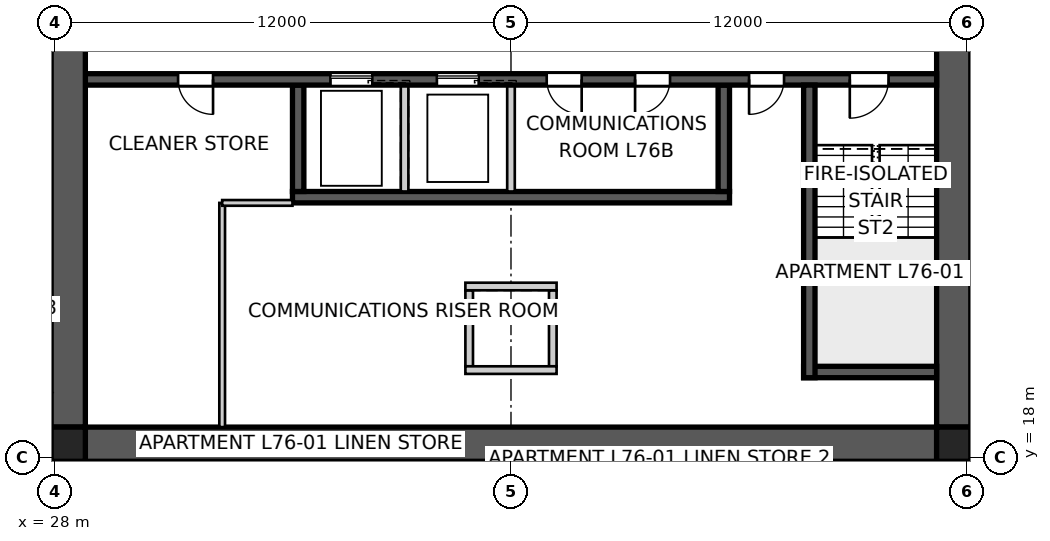
"""IFC4 building model, lengths in metres.
Left out: names, types, materials, properties, quantities, classifications, styles, units other than length and angle.
Written with IfcOpenShell. Run it as: python <this file> out.ifc"""

import sys

from ifc_helpers import new_model, si_unit, direction, frame, frame_2d, origin, origin_2d, place, context, subcontext, project, spatial, polyline, rectangle, outline, extrude, element, fill, save


model = new_model("IFC4")
c1 = context("Model", 3, precision=1e-05, world=origin(), true_north=direction((0.0, 1.0)))
c2 = subcontext(c1, "Body", "Model", "MODEL_VIEW")
j1 = project(units=[si_unit("LENGTHUNIT", "METRE"), si_unit("PLANEANGLEUNIT", "RADIAN")], contexts=[c1])
p1 = place(None, origin())
s1 = spatial("IfcSite", under=j1, at=p1, CompositionType="ELEMENT")
p2 = place(p1, origin())
s2 = spatial("IfcBuilding", under=s1, at=p2, CompositionType="ELEMENT")
p3 = place(p2, frame((0.0, 0.0, 276.0)))
s3 = spatial("IfcBuildingStorey", under=s2, at=p3, CompositionType="ELEMENT", Elevation=276.0)
p4 = place(p3, frame((51.2, 18.35, 0.0), z_axis=(0.0, 0.0, 1.0), x_axis=(-1.0, 0.0, 0.0)))
e1 = element("IfcWall", 1, at=p4, inside=s3, PredefinedType="SHEAR", context=c2, shape_type="SweptSolid", body=[
    extrude(outline(polyline([(0.0, -0.45), (22.4, -0.45), (22.4, -0.025), (22.85, -0.025), (22.85, 0.025), (22.4, 0.025), (22.4, 0.45), (0.0, 0.45), (0.0, 0.025), (-0.45, 0.025), (-0.45, -0.025), (0.0, -0.025), (0.0, -0.45)])), origin(), (0.0, 0.0, 1.0), 3.4),
])
p5 = place(p3, frame((51.65, 18.8, 0.0), z_axis=(0.0, 0.0, 1.0), x_axis=(0.0, 1.0, 0.0)))
e2 = element("IfcWall", 2, at=p5, inside=s3, PredefinedType="SHEAR", context=c2, shape_type="SweptSolid", body=[
    extrude(outline(polyline([(0.0, -0.45), (22.4, -0.45), (22.4, -0.025), (22.85, -0.025), (22.85, 0.025), (22.4, 0.025), (22.4, 0.45), (0.0, 0.45), (0.0, 0.025), (-0.45, 0.025), (-0.45, -0.025), (0.0, -0.025), (0.0, -0.45)])), origin(), (0.0, 0.0, 1.0), 3.4),
])
p6 = place(p5, frame((11.14, 0.0, 0.0)))
e3 = element("IfcOpeningElement", 3, at=p6, cuts=e2, PredefinedType="OPENING", context=c2, shape_type="SweptSolid", body=[
    extrude(rectangle(XDim=1.02, YDim=2.4, at=frame_2d((0.51, 1.2))), frame((0.0, 0.46, 0.0), z_axis=(0.0, -1.0, 0.0), x_axis=(1.0, 0.0, 0.0)), (0.0, 0.0, 1.0), 0.92),
])
p7 = place(p3, frame((28.35, 41.2, 0.0), z_axis=(0.0, 0.0, 1.0), x_axis=(0.0, -1.0, 0.0)))
e4 = element("IfcWall", 4, at=p7, inside=s3, PredefinedType="SHEAR", context=c2, shape_type="SweptSolid", body=[
    extrude(outline(polyline([(0.0, -0.45), (22.4, -0.45), (22.4, -0.025), (22.85, -0.025), (22.85, 0.025), (22.4, 0.025), (22.4, 0.45), (0.0, 0.45), (0.0, 0.025), (-0.45, 0.025), (-0.45, -0.025), (0.0, -0.025), (0.0, -0.45)])), origin(), (0.0, 0.0, 1.0), 3.4),
])
p8 = place(p7, frame((11.14, 0.0, 0.0)))
e5 = element("IfcOpeningElement", 5, at=p8, cuts=e4, PredefinedType="OPENING", context=c2, shape_type="SweptSolid", body=[
    extrude(rectangle(XDim=1.02, YDim=2.4, at=frame_2d((0.51, 1.2))), frame((0.0, 0.46, 0.0), z_axis=(0.0, -1.0, 0.0), x_axis=(1.0, 0.0, 0.0)), (0.0, 0.0, 1.0), 0.92),
])
p9 = place(p3, frame((51.2, 27.95, 0.0), z_axis=(0.0, 0.0, 1.0), x_axis=(-1.0, 0.0, 0.0)))
e6 = element("IfcWall", 6, at=p9, inside=s3, PredefinedType="SHEAR", context=c2, shape_type="SweptSolid", body=[
    extrude(rectangle(XDim=22.4, YDim=0.3, at=frame_2d((11.2, 0.0))), origin(), (0.0, 0.0, 1.0), 3.4),
])
p10 = place(p9, frame((19.04, 0.0, 0.0)))
e7 = element("IfcOpeningElement", 7, at=p10, cuts=e6, PredefinedType="OPENING", context=c2, shape_type="SweptSolid", body=[
    extrude(rectangle(XDim=0.92, YDim=2.1, at=frame_2d((0.46, 1.05))), frame((0.0, 0.16, 0.0), z_axis=(0.0, -1.0, 0.0), x_axis=(1.0, 0.0, 0.0)), (0.0, 0.0, 1.0), 0.32),
])
p11 = place(p9, frame((1.265, 0.0, 0.0)))
e8 = element("IfcOpeningElement", 8, at=p11, cuts=e6, PredefinedType="OPENING", context=c2, shape_type="SweptSolid", body=[
    extrude(rectangle(XDim=1.02, YDim=2.1, at=frame_2d((0.51, 1.05))), frame((0.0, 0.16, 0.0), z_axis=(0.0, -1.0, 0.0), x_axis=(1.0, 0.0, 0.0)), (0.0, 0.0, 1.0), 0.32),
])
p12 = place(p9, frame((4.015, 0.0, 0.0)))
e9 = element("IfcOpeningElement", 9, at=p12, cuts=e6, PredefinedType="OPENING", context=c2, shape_type="SweptSolid", body=[
    extrude(rectangle(XDim=0.92, YDim=2.1, at=frame_2d((0.46, 1.05))), frame((0.0, 0.16, 0.0), z_axis=(0.0, -1.0, 0.0), x_axis=(1.0, 0.0, 0.0)), (0.0, 0.0, 1.0), 0.32),
])
p13 = place(p9, frame((9.34, 0.0, 0.0)))
e10 = element("IfcOpeningElement", 10, at=p13, cuts=e6, PredefinedType="OPENING", context=c2, shape_type="SweptSolid", body=[
    extrude(rectangle(XDim=0.92, YDim=2.1, at=frame_2d((0.46, 1.05))), frame((0.0, 0.16, 0.0), z_axis=(0.0, -1.0, 0.0), x_axis=(1.0, 0.0, 0.0)), (0.0, 0.0, 1.0), 0.32),
])
p14 = place(p9, frame((7.015, 0.0, 0.0)))
e11 = element("IfcOpeningElement", 11, at=p14, cuts=e6, PredefinedType="OPENING", context=c2, shape_type="SweptSolid", body=[
    extrude(rectangle(XDim=0.92, YDim=2.1, at=frame_2d((0.46, 1.05))), frame((0.0, 0.16, 0.0), z_axis=(0.0, -1.0, 0.0), x_axis=(1.0, 0.0, 0.0)), (0.0, 0.0, 1.0), 0.32),
])
p15 = place(p9, frame((12.05, 0.0, 0.0)))
e12 = element("IfcOpeningElement", 12, at=p15, cuts=e6, PredefinedType="OPENING", context=c2, shape_type="SweptSolid", body=[
    extrude(rectangle(XDim=1.1, YDim=2.1, at=frame_2d((0.55, 1.05))), frame((0.0, 0.16, 0.0), z_axis=(0.0, -1.0, 0.0), x_axis=(1.0, 0.0, 0.0)), (0.0, 0.0, 1.0), 0.32),
])
p16 = place(p9, frame((14.85, 0.0, 0.0)))
e13 = element("IfcOpeningElement", 13, at=p16, cuts=e6, PredefinedType="OPENING", context=c2, shape_type="SweptSolid", body=[
    extrude(rectangle(XDim=1.1, YDim=2.1, at=frame_2d((0.55, 1.05))), frame((0.0, 0.16, 0.0), z_axis=(0.0, -1.0, 0.0), x_axis=(1.0, 0.0, 0.0)), (0.0, 0.0, 1.0), 0.32),
])
p17 = place(p3, frame((45.75, 24.85, 0.0), z_axis=(0.0, 0.0, 1.0), x_axis=(-1.0, 0.0, 0.0)))
e14 = element("IfcWall", 14, at=p17, inside=s3, PredefinedType="SHEAR", context=c2, shape_type="SweptSolid", body=[
    extrude(rectangle(XDim=11.5, YDim=0.3, at=frame_2d((5.75, 0.0))), origin(), (0.0, 0.0, 1.0), 3.4),
])
p18 = place(p3, frame((45.6, 27.8, 0.0), z_axis=(0.0, 0.0, 1.0), x_axis=(0.0, -1.0, 0.0)))
e15 = element("IfcWall", 15, at=p18, inside=s3, PredefinedType="SHEAR", context=c2, shape_type="SweptSolid", body=[
    extrude(rectangle(XDim=2.8, YDim=0.3, at=frame_2d((1.4, 0.0))), origin(), (0.0, 0.0, 1.0), 3.4),
])
for number, where, z_axis, x_axis in (
    (16, (40.0, 27.8, 0.0), (0.0, 0.0, 1.0), (0.0, -1.0, 0.0)),
    (17, (37.2, 27.8, 0.0), (0.0, 0.0, 1.0), (0.0, -1.0, 0.0)),
):
    element("IfcWall", number, at=place(p3, frame(where, z_axis=z_axis, x_axis=x_axis)), inside=s3, PredefinedType="SOLIDWALL", context=c2, shape_type="SweptSolid", body=[
        extrude(rectangle(XDim=2.8, YDim=0.2, at=frame_2d((1.4, 0.0))), origin(), (0.0, 0.0, 1.0), 3.4),
    ])
p19 = place(p3, frame((34.4, 27.8, 0.0), z_axis=(0.0, 0.0, 1.0), x_axis=(0.0, -1.0, 0.0)))
e18 = element("IfcWall", 18, at=p19, inside=s3, PredefinedType="SHEAR", context=c2, shape_type="SweptSolid", body=[
    extrude(rectangle(XDim=2.8, YDim=0.3, at=frame_2d((1.4, 0.0))), origin(), (0.0, 0.0, 1.0), 3.4),
])
p20 = place(p3, frame((47.85, 27.8, 0.0), z_axis=(0.0, 0.0, 1.0), x_axis=(0.0, -1.0, 0.0)))
e19 = element("IfcWall", 19, at=p20, inside=s3, PredefinedType="SHEAR", context=c2, shape_type="SweptSolid", body=[
    extrude(rectangle(XDim=7.7, YDim=0.3, at=frame_2d((3.85, 0.0))), origin(), (0.0, 0.0, 1.0), 3.4),
])
p21 = place(p3, frame((51.2, 20.25, 0.0), z_axis=(0.0, 0.0, 1.0), x_axis=(-1.0, 0.0, 0.0)))
e20 = element("IfcWall", 20, at=p21, inside=s3, PredefinedType="SHEAR", context=c2, shape_type="SweptSolid", body=[
    extrude(rectangle(XDim=3.5, YDim=0.3, at=frame_2d((1.75, 0.0))), origin(), (0.0, 0.0, 1.0), 3.4),
])
for number, where, z_axis, x_axis in (
    (21, (38.9, 22.4, 0.0), (0.0, 0.0, 1.0), (0.0, -1.0, 0.0)),
    (22, (41.1, 22.4, 0.0), (0.0, 0.0, 1.0), (0.0, -1.0, 0.0)),
):
    element("IfcWall", number, at=place(p3, frame(where, z_axis=z_axis, x_axis=x_axis)), inside=s3, PredefinedType="SOLIDWALL", context=c2, shape_type="SweptSolid", body=[
        extrude(rectangle(XDim=2.0, YDim=0.2, at=frame_2d((1.0, 0.0))), origin(), (0.0, 0.0, 1.0), 3.4),
    ])
for number, where, z_axis, x_axis in (
    (23, (38.8, 22.5, 0.0), (0.0, 0.0, 1.0), (1.0, 0.0, 0.0)),
    (24, (38.8, 20.3, 0.0), (0.0, 0.0, 1.0), (1.0, 0.0, 0.0)),
):
    element("IfcWall", number, at=place(p3, frame(where, z_axis=z_axis, x_axis=x_axis)), inside=s3, PredefinedType="SOLIDWALL", context=c2, shape_type="SweptSolid", body=[
        extrude(rectangle(XDim=2.4, YDim=0.2, at=frame_2d((1.2, 0.0))), origin(), (0.0, 0.0, 1.0), 3.4),
    ])
for number, where, z_axis, x_axis in (
    (25, (28.35, 18.35, 0.0), (0.0, 0.0, 1.0), (1.0, 0.0, 0.0)),
    (26, (51.65, 18.35, 0.0), (0.0, 0.0, 1.0), (1.0, 0.0, 0.0)),
):
    element("IfcColumn", number, at=place(p3, frame(where, z_axis=z_axis, x_axis=x_axis)), inside=s3, PredefinedType="COLUMN", context=c2, shape_type="SweptSolid", body=[
        extrude(rectangle(XDim=0.9, YDim=0.9, at=origin_2d()), origin(), (0.0, 0.0, 1.0), 3.4),
    ])
p22 = place(p3, frame((24.296, 16.823, 0.0), z_axis=(0.0, 0.0, 1.0), x_axis=(0.76603440109, 0.64279957712, 0.0)))
e27 = element("IfcWall", 27, at=p22, inside=s3, PredefinedType="PARTITIONING", context=c2, shape_type="SweptSolid", body=[
    extrude(rectangle(XDim=4.64, YDim=0.25, at=frame_2d((2.32, 0.0))), origin(), (0.0, 0.0, 1.0), 3.25),
])
p23 = place(p3, frame((32.4, 18.8, 0.0), z_axis=(0.0, 0.0, 1.0), x_axis=(0.0, 1.0, 0.0)))
e28 = element("IfcWall", 28, at=p23, inside=s3, PredefinedType="SOLIDWALL", context=c2, shape_type="SweptSolid", body=[
    extrude(rectangle(XDim=5.9, YDim=0.15, at=frame_2d((2.95, 0.0))), origin(), (0.0, 0.0, 1.0), 3.25),
])
p24 = place(p3, frame((32.4, 24.7, 0.0), z_axis=(0.0, 0.0, 1.0), x_axis=(1.0, 0.0, 0.0)))
e29 = element("IfcWall", 29, at=p24, inside=s3, PredefinedType="SOLIDWALL", context=c2, shape_type="SweptSolid", body=[
    extrude(rectangle(XDim=1.85, YDim=0.15, at=frame_2d((0.925, 0.0))), origin(), (0.0, 0.0, 1.0), 3.25),
])
p25 = place(p3, frame((51.18, 18.689, 0.0), z_axis=(0.0, 0.0, 1.0), x_axis=(1.0, 0.0, 0.0)))
e30 = element("IfcWall", 30, at=p25, inside=s3, PredefinedType="SOLIDWALL", context=c2, shape_type="SweptSolid", body=[
    extrude(rectangle(XDim=5.82, YDim=0.15, at=frame_2d((2.91, 0.0))), origin(), (0.0, 0.0, 1.0), 3.25),
])
p26 = place(p25, frame((2.91, 0.0, 0.0)))
e31 = element("IfcOpeningElement", 31, at=p26, cuts=e30, PredefinedType="OPENING", context=c2, shape_type="SweptSolid", body=[
    extrude(rectangle(XDim=0.92, YDim=2.1, at=frame_2d((0.46, 1.05))), frame((0.0, 0.085, 0.0), z_axis=(0.0, -1.0, 0.0), x_axis=(1.0, 0.0, 0.0)), (0.0, 0.0, 1.0), 0.17),
])
p27 = place(p10, origin())
e32 = element("IfcDoor", 32, at=p27, inside=s3, OperationType="SINGLE_SWING_LEFT", PredefinedType="DOOR", context=c2, shape_type="SweptSolid", body=[
    extrude(rectangle(XDim=0.92, YDim=2.1, at=frame_2d((0.46, 1.05))), frame((0.0, 0.025, 0.0), z_axis=(0.0, -1.0, 0.0), x_axis=(1.0, 0.0, 0.0)), (0.0, 0.0, 1.0), 0.05),
])
fill(e7, e32)
p28 = place(p11, origin())
e33 = element("IfcDoor", 33, at=p28, inside=s3, OperationType="SINGLE_SWING_RIGHT", PredefinedType="DOOR", context=c2, shape_type="SweptSolid", body=[
    extrude(rectangle(XDim=1.02, YDim=2.1, at=frame_2d((0.51, 1.05))), frame((0.0, 0.025, 0.0), z_axis=(0.0, -1.0, 0.0), x_axis=(1.0, 0.0, 0.0)), (0.0, 0.0, 1.0), 0.05),
])
fill(e8, e33)
p29 = place(p12, origin())
e34 = element("IfcDoor", 34, at=p29, inside=s3, OperationType="SINGLE_SWING_RIGHT", PredefinedType="DOOR", context=c2, shape_type="SweptSolid", body=[
    extrude(rectangle(XDim=0.92, YDim=2.1, at=frame_2d((0.46, 1.05))), frame((0.0, 0.025, 0.0), z_axis=(0.0, -1.0, 0.0), x_axis=(1.0, 0.0, 0.0)), (0.0, 0.0, 1.0), 0.05),
])
fill(e9, e34)
p30 = place(p13, origin())
e35 = element("IfcDoor", 35, at=p30, inside=s3, OperationType="SINGLE_SWING_LEFT", PredefinedType="DOOR", context=c2, shape_type="SweptSolid", body=[
    extrude(rectangle(XDim=0.92, YDim=2.1, at=frame_2d((0.46, 1.05))), frame((0.0, 0.025, 0.0), z_axis=(0.0, -1.0, 0.0), x_axis=(1.0, 0.0, 0.0)), (0.0, 0.0, 1.0), 0.05),
])
fill(e10, e35)
p31 = place(p14, origin())
e36 = element("IfcDoor", 36, at=p31, inside=s3, OperationType="SINGLE_SWING_RIGHT", PredefinedType="DOOR", context=c2, shape_type="SweptSolid", body=[
    extrude(rectangle(XDim=0.92, YDim=2.1, at=frame_2d((0.46, 1.05))), frame((0.0, 0.025, 0.0), z_axis=(0.0, -1.0, 0.0), x_axis=(1.0, 0.0, 0.0)), (0.0, 0.0, 1.0), 0.05),
])
fill(e11, e36)
p32 = place(p15, origin())
e37 = element("IfcDoor", 37, at=p32, inside=s3, OperationType="SLIDING_TO_LEFT", PredefinedType="DOOR", context=c2, shape_type="SweptSolid", body=[
    extrude(rectangle(XDim=1.1, YDim=2.1, at=frame_2d((0.55, 1.05))), frame((0.0, 0.025, 0.0), z_axis=(0.0, -1.0, 0.0), x_axis=(1.0, 0.0, 0.0)), (0.0, 0.0, 1.0), 0.05),
])
fill(e12, e37)
p33 = place(p16, origin())
e38 = element("IfcDoor", 38, at=p33, inside=s3, OperationType="SLIDING_TO_LEFT", PredefinedType="DOOR", context=c2, shape_type="SweptSolid", body=[
    extrude(rectangle(XDim=1.1, YDim=2.1, at=frame_2d((0.55, 1.05))), frame((0.0, 0.025, 0.0), z_axis=(0.0, -1.0, 0.0), x_axis=(1.0, 0.0, 0.0)), (0.0, 0.0, 1.0), 0.05),
])
fill(e13, e38)
save(model, sys.argv[1])
